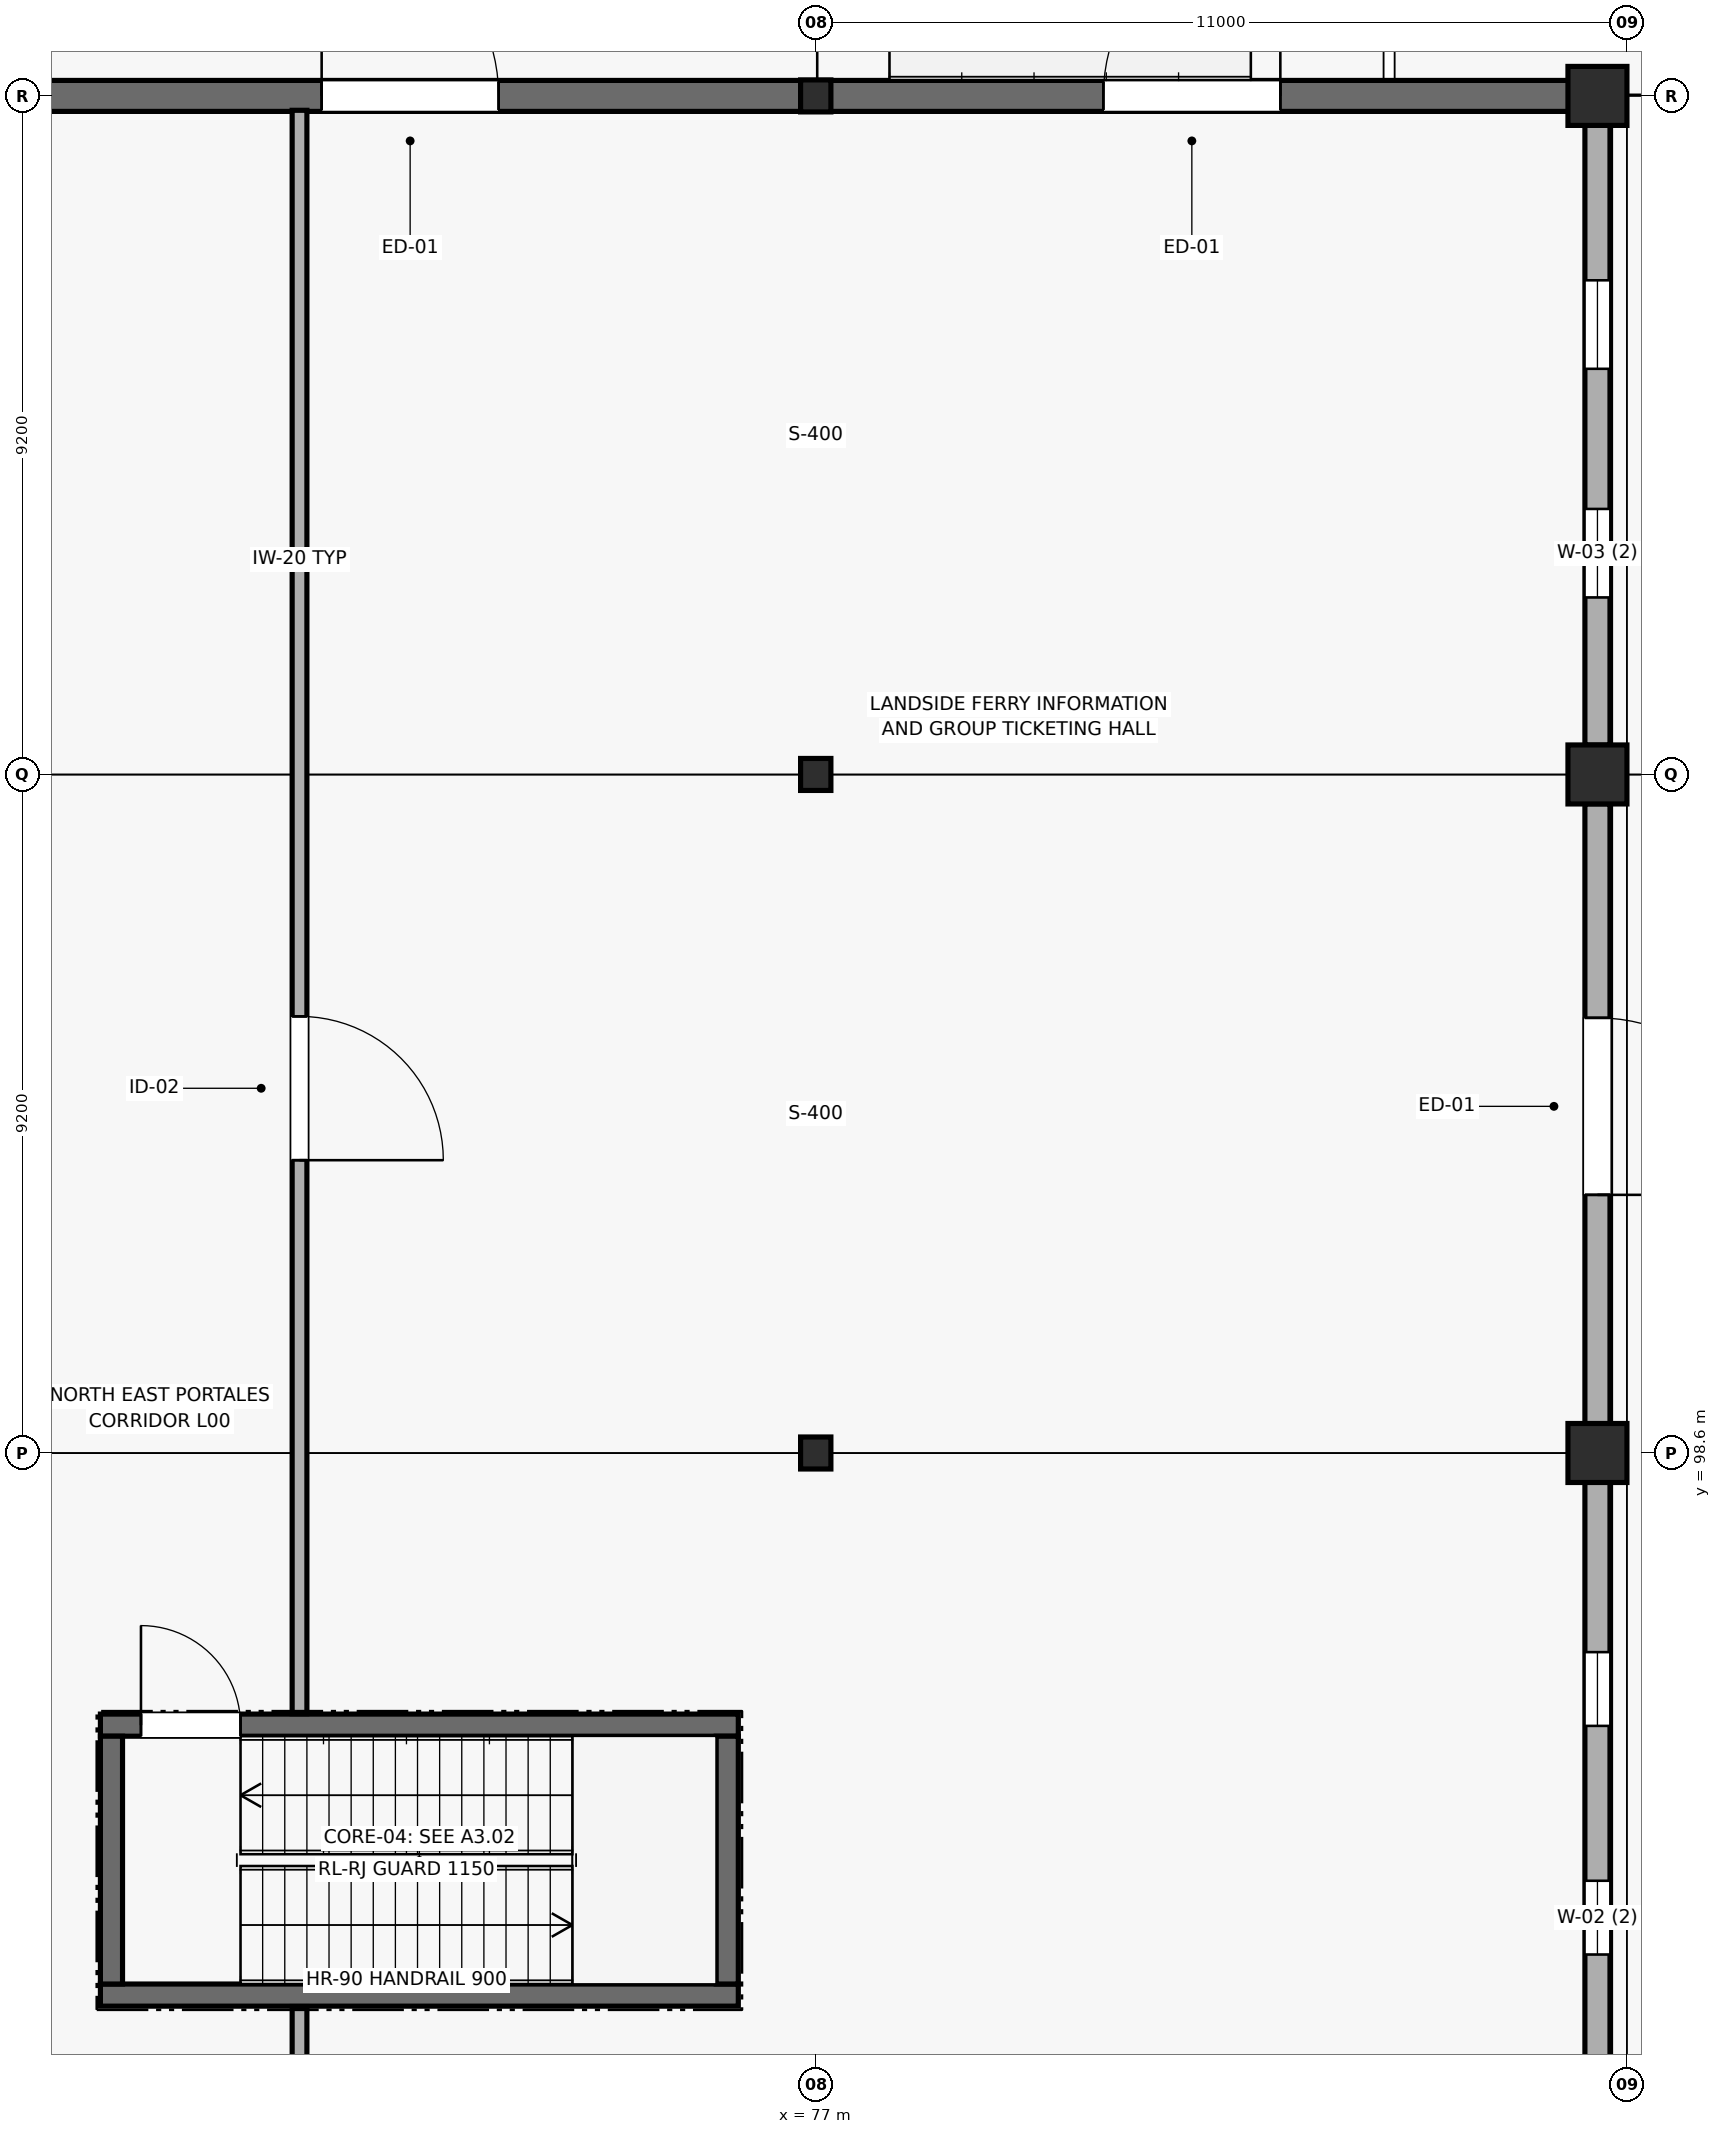
"""IFC4 building model, lengths in metres.
Left out: names, types, materials, properties, quantities, classifications, styles, units other than length and angle.
Written with IfcOpenShell. Run it as: python <this file> out.ifc"""

import sys

from ifc_helpers import new_model, si_unit, direction, frame, frame_2d, origin, origin_2d, place, context, subcontext, project, spatial, rectangle, i_section, extrude, element, fill, save


model = new_model("IFC4")
c1 = context("Model", 3, precision=1e-05, world=origin(), true_north=direction((0.0, 1.0)))
c2 = subcontext(c1, "Body", "Model", "MODEL_VIEW")
j1 = project(units=[si_unit("LENGTHUNIT", "METRE"), si_unit("PLANEANGLEUNIT", "RADIAN")], contexts=[c1])
p1 = place(None, origin())
s1 = spatial("IfcSite", under=j1, at=p1, CompositionType="ELEMENT")
p2 = place(p1, origin())
s2 = spatial("IfcBuilding", under=s1, at=p2, CompositionType="ELEMENT")
p3 = place(p2, origin())
s3 = spatial("IfcBuildingStorey", under=s2, at=p3, CompositionType="ELEMENT", Elevation=0.0)
for number, where, z_axis, x_axis in (
    (1, (77.0, 98.6, 0.0), (0.0, 0.0, 1.0), (1.0, 0.0, 0.0)),
    (2, (77.0, 107.8, 0.0), (0.0, 0.0, 1.0), (1.0, 0.0, 0.0)),
    (3, (77.0, 117.0, 0.0), (0.0, 0.0, 1.0), (1.0, 0.0, 0.0)),
):
    element("IfcColumn", number, at=place(p3, frame(where, z_axis=z_axis, x_axis=x_axis)), inside=s3, PredefinedType="COLUMN", context=c2, shape_type="SweptSolid", body=[
        extrude(i_section(OverallWidth=0.411, OverallDepth=0.434, WebThickness=0.036, FlangeThickness=0.057, at=origin_2d()), origin(), (0.0, 0.0, 1.0), 5.4),
    ])
for number, where, z_axis, x_axis in (
    (4, (87.6, 98.6, 0.0), (0.0, 0.0, 1.0), (1.0, 0.0, 0.0)),
    (5, (87.6, 107.8, 0.0), (0.0, 0.0, 1.0), (1.0, 0.0, 0.0)),
    (6, (87.6, 117.0, 0.0), (0.0, 0.0, 1.0), (1.0, 0.0, 0.0)),
):
    element("IfcColumn", number, at=place(p3, frame(where, z_axis=z_axis, x_axis=x_axis)), inside=s3, PredefinedType="COLUMN", context=c2, shape_type="SweptSolid", body=[
        extrude(rectangle(XDim=0.8, YDim=0.8, at=origin_2d()), origin(), (0.0, 0.0, 1.0), 5.4),
    ])
p4 = place(p3, frame((76.984, 117.0, 0.0), z_axis=(0.0, 0.0, 1.0), x_axis=(-1.0, 0.0, 0.0)))
e7 = element("IfcWall", 7, at=p4, inside=s3, PredefinedType="SOLIDWALL", context=c2, shape_type="SweptSolid", body=[
    extrude(rectangle(XDim=10.586, YDim=0.38, at=frame_2d((5.293, 0.0))), origin(), (0.0, 0.0, 1.0), 4.425),
])
p5 = place(p4, frame((4.284, 0.0, 0.0)))
e8 = element("IfcOpeningElement", 8, at=p5, cuts=e7, PredefinedType="OPENING", context=c2, shape_type="SweptSolid", body=[
    extrude(rectangle(XDim=2.4, YDim=2.6, at=frame_2d((1.2, 1.3))), frame((0.0, 0.2, 0.0), z_axis=(0.0, -1.0, 0.0), x_axis=(1.0, 0.0, 0.0)), (0.0, 0.0, 1.0), 0.4),
])
p6 = place(p3, frame((87.202, 117.0, 0.0), z_axis=(0.0, 0.0, 1.0), x_axis=(-1.0, 0.0, 0.0)))
e9 = element("IfcWall", 9, at=p6, inside=s3, PredefinedType="SOLIDWALL", context=c2, shape_type="SweptSolid", body=[
    extrude(rectangle(XDim=10.186, YDim=0.38, at=frame_2d((5.093, 0.0))), origin(), (0.0, 0.0, 1.0), 4.425),
])
p7 = place(p6, frame((3.902, 0.0, 0.0)))
e10 = element("IfcOpeningElement", 10, at=p7, cuts=e9, PredefinedType="OPENING", context=c2, shape_type="SweptSolid", body=[
    extrude(rectangle(XDim=2.4, YDim=2.6, at=frame_2d((1.2, 1.3))), frame((0.0, 0.2, 0.0), z_axis=(0.0, -1.0, 0.0), x_axis=(1.0, 0.0, 0.0)), (0.0, 0.0, 1.0), 0.4),
])
p8 = place(p3, frame((87.6, 89.798, 0.0), z_axis=(0.0, 0.0, 1.0), x_axis=(0.0, 1.0, 0.0)))
e11 = element("IfcWall", 11, at=p8, inside=s3, PredefinedType="SOLIDWALL", context=c2, shape_type="SweptSolid", body=[
    extrude(rectangle(XDim=8.404, YDim=0.34, at=frame_2d((4.202, 0.0))), origin(), (0.0, 0.0, 1.0), 4.525),
])
p9 = place(p8, frame((2.002, 0.0, 0.95)))
e12 = element("IfcOpeningElement", 12, at=p9, cuts=e11, PredefinedType="OPENING", context=c2, shape_type="SweptSolid", body=[
    extrude(rectangle(XDim=1.0, YDim=1.8, at=frame_2d((0.5, 0.9))), frame((0.0, 0.18, 0.0), z_axis=(0.0, -1.0, 0.0), x_axis=(1.0, 0.0, 0.0)), (0.0, 0.0, 1.0), 0.36),
])
p10 = place(p8, frame((5.102, 0.0, 0.95)))
e13 = element("IfcOpeningElement", 13, at=p10, cuts=e11, PredefinedType="OPENING", context=c2, shape_type="SweptSolid", body=[
    extrude(rectangle(XDim=1.0, YDim=1.8, at=frame_2d((0.5, 0.9))), frame((0.0, 0.18, 0.0), z_axis=(0.0, -1.0, 0.0), x_axis=(1.0, 0.0, 0.0)), (0.0, 0.0, 1.0), 0.36),
])
p11 = place(p3, frame((87.6, 98.998, 0.0), z_axis=(0.0, 0.0, 1.0), x_axis=(0.0, 1.0, 0.0)))
e14 = element("IfcWall", 14, at=p11, inside=s3, PredefinedType="SOLIDWALL", context=c2, shape_type="SweptSolid", body=[
    extrude(rectangle(XDim=8.404, YDim=0.34, at=frame_2d((4.202, 0.0))), origin(), (0.0, 0.0, 1.0), 4.525),
])
p12 = place(p11, frame((3.102, 0.0, 0.0)))
e15 = element("IfcOpeningElement", 15, at=p12, cuts=e14, PredefinedType="OPENING", context=c2, shape_type="SweptSolid", body=[
    extrude(rectangle(XDim=2.4, YDim=2.6, at=frame_2d((1.2, 1.3))), frame((0.0, 0.18, 0.0), z_axis=(0.0, -1.0, 0.0), x_axis=(1.0, 0.0, 0.0)), (0.0, 0.0, 1.0), 0.36),
])
p13 = place(p3, frame((87.6, 108.198, 0.0), z_axis=(0.0, 0.0, 1.0), x_axis=(0.0, 1.0, 0.0)))
e16 = element("IfcWall", 16, at=p13, inside=s3, PredefinedType="SOLIDWALL", context=c2, shape_type="SweptSolid", body=[
    extrude(rectangle(XDim=8.404, YDim=0.34, at=frame_2d((4.202, 0.0))), origin(), (0.0, 0.0, 1.0), 4.525),
])
p14 = place(p13, frame((2.002, 0.0, 0.95)))
e17 = element("IfcOpeningElement", 17, at=p14, cuts=e16, PredefinedType="OPENING", context=c2, shape_type="SweptSolid", body=[
    extrude(rectangle(XDim=1.2, YDim=1.8, at=frame_2d((0.6, 0.9))), frame((0.0, 0.18, 0.0), z_axis=(0.0, -1.0, 0.0), x_axis=(1.0, 0.0, 0.0)), (0.0, 0.0, 1.0), 0.36),
])
p15 = place(p13, frame((5.102, 0.0, 0.95)))
e18 = element("IfcOpeningElement", 18, at=p15, cuts=e16, PredefinedType="OPENING", context=c2, shape_type="SweptSolid", body=[
    extrude(rectangle(XDim=1.2, YDim=1.8, at=frame_2d((0.6, 0.9))), frame((0.0, 0.18, 0.0), z_axis=(0.0, -1.0, 0.0), x_axis=(1.0, 0.0, 0.0)), (0.0, 0.0, 1.0), 0.36),
])
p16 = place(p3, frame((44.5, 117.0, -1.0), z_axis=(0.0, 0.0, 1.0), x_axis=(1.0, 0.0, 0.0)))
e19 = element("IfcWall", 19, at=p16, inside=s3, PredefinedType="USERDEFINED", context=c2, shape_type="SweptSolid", body=[
    extrude(rectangle(XDim=43.0, YDim=0.42, at=frame_2d((21.5, 0.0))), origin(), (0.0, 0.0, 1.0), 0.58),
])
p17 = place(p3, frame((67.3, 91.25, 0.0), z_axis=(0.0, 0.0, 1.0), x_axis=(1.0, 0.0, 0.0)))
e20 = element("IfcWall", 20, at=p17, inside=s3, PredefinedType="SHEAR", context=c2, shape_type="SweptSolid", body=[
    extrude(rectangle(XDim=8.65, YDim=0.3, at=frame_2d((4.325, 0.0))), origin(), (0.0, 0.0, 1.0), 5.18),
])
p18 = place(p3, frame((75.95, 94.91, 0.0), z_axis=(0.0, 0.0, 1.0), x_axis=(-1.0, 0.0, 0.0)))
e21 = element("IfcWall", 21, at=p18, inside=s3, PredefinedType="SHEAR", context=c2, shape_type="SweptSolid", body=[
    extrude(rectangle(XDim=8.65, YDim=0.3, at=frame_2d((4.325, 0.0))), origin(), (0.0, 0.0, 1.0), 5.18),
])
p19 = place(p18, frame((6.75, 0.0, 0.0)))
e22 = element("IfcOpeningElement", 22, at=p19, cuts=e21, PredefinedType="OPENING", context=c2, shape_type="SweptSolid", body=[
    extrude(rectangle(XDim=1.35, YDim=2.2, at=frame_2d((0.675, 1.1))), frame((0.0, 0.16, 0.0), z_axis=(0.0, -1.0, 0.0), x_axis=(1.0, 0.0, 0.0)), (0.0, 0.0, 1.0), 0.32),
])
for number, where, z_axis, x_axis in (
    (23, (67.45, 94.76, 0.0), (0.0, 0.0, 1.0), (0.0, -1.0, 0.0)),
    (24, (75.8, 91.4, 0.0), (0.0, 0.0, 1.0), (0.0, 1.0, 0.0)),
):
    element("IfcWall", number, at=place(p3, frame(where, z_axis=z_axis, x_axis=x_axis)), inside=s3, PredefinedType="SHEAR", context=c2, shape_type="SweptSolid", body=[
        extrude(rectangle(XDim=3.36, YDim=0.3, at=frame_2d((1.68, 0.0))), origin(), (0.0, 0.0, 1.0), 5.18),
    ])
p20 = place(p3, frame((70.0, 95.065, 0.0), z_axis=(0.0, 0.0, 1.0), x_axis=(0.0, 1.0, 0.0)))
e25 = element("IfcWall", 25, at=p20, inside=s3, PredefinedType="PARTITIONING", context=c2, shape_type="SweptSolid", body=[
    extrude(rectangle(XDim=21.74, YDim=0.2, at=frame_2d((10.87, 0.0))), origin(), (0.0, 0.0, 1.0), 4.425),
])
p21 = place(p20, frame((7.505, 0.0, 0.0)))
e26 = element("IfcOpeningElement", 26, at=p21, cuts=e25, PredefinedType="OPENING", context=c2, shape_type="SweptSolid", body=[
    extrude(rectangle(XDim=1.95, YDim=2.45, at=frame_2d((0.975, 1.225))), frame((0.0, 0.11, 0.0), z_axis=(0.0, -1.0, 0.0), x_axis=(1.0, 0.0, 0.0)), (0.0, 0.0, 1.0), 0.22),
])
p22 = place(p3, frame((70.0, 71.775, 0.0), z_axis=(0.0, 0.0, 1.0), x_axis=(0.0, 1.0, 0.0)))
e27 = element("IfcWall", 27, at=p22, inside=s3, PredefinedType="PARTITIONING", context=c2, shape_type="SweptSolid", body=[
    extrude(rectangle(XDim=19.32, YDim=0.2, at=frame_2d((9.66, 0.0))), origin(), (0.0, 0.0, 1.0), 4.425),
])
p23 = place(p22, frame((7.525, 0.0, 0.0)))
e28 = element("IfcOpeningElement", 28, at=p23, cuts=e27, PredefinedType="OPENING", context=c2, shape_type="SweptSolid", body=[
    extrude(rectangle(XDim=1.85, YDim=2.4, at=frame_2d((0.925, 1.2))), frame((0.0, 0.11, 0.0), z_axis=(0.0, -1.0, 0.0), x_axis=(1.0, 0.0, 0.0)), (0.0, 0.0, 1.0), 0.22),
])
p24 = place(p5, frame((2.4, 0.0, 0.0), z_axis=(0.0, 0.0, 1.0), x_axis=(-1.0, 0.0, 0.0)))
e29 = element("IfcDoor", 29, at=p24, inside=s3, OperationType="SINGLE_SWING_LEFT", PredefinedType="DOOR", context=c2, shape_type="SweptSolid", body=[
    extrude(rectangle(XDim=2.4, YDim=2.6, at=frame_2d((1.2, 1.3))), frame((0.0, 0.025, 0.0), z_axis=(0.0, -1.0, 0.0), x_axis=(1.0, 0.0, 0.0)), (0.0, 0.0, 1.0), 0.05),
])
fill(e8, e29)
p25 = place(p7, frame((2.4, 0.0, 0.0), z_axis=(0.0, 0.0, 1.0), x_axis=(-1.0, 0.0, 0.0)))
e30 = element("IfcDoor", 30, at=p25, inside=s3, OperationType="SINGLE_SWING_RIGHT", PredefinedType="DOOR", context=c2, shape_type="SweptSolid", body=[
    extrude(rectangle(XDim=2.4, YDim=2.6, at=frame_2d((1.2, 1.3))), frame((0.0, 0.025, 0.0), z_axis=(0.0, -1.0, 0.0), x_axis=(1.0, 0.0, 0.0)), (0.0, 0.0, 1.0), 0.05),
])
fill(e10, e30)
p26 = place(p9, origin())
e31 = element("IfcWindow", 31, at=p26, inside=s3, PartitioningType="SINGLE_PANEL", PredefinedType="WINDOW", context=c2, shape_type="SweptSolid", body=[
    extrude(rectangle(XDim=1.0, YDim=1.8, at=frame_2d((0.5, 0.9))), frame((0.0, 0.03, 0.0), z_axis=(0.0, -1.0, 0.0), x_axis=(1.0, 0.0, 0.0)), (0.0, 0.0, 1.0), 0.06),
])
fill(e12, e31)
p27 = place(p10, origin())
e32 = element("IfcWindow", 32, at=p27, inside=s3, PartitioningType="SINGLE_PANEL", PredefinedType="WINDOW", context=c2, shape_type="SweptSolid", body=[
    extrude(rectangle(XDim=1.0, YDim=1.8, at=frame_2d((0.5, 0.9))), frame((0.0, 0.03, 0.0), z_axis=(0.0, -1.0, 0.0), x_axis=(1.0, 0.0, 0.0)), (0.0, 0.0, 1.0), 0.06),
])
fill(e13, e32)
p28 = place(p12, frame((2.4, 0.0, 0.0), z_axis=(0.0, 0.0, 1.0), x_axis=(-1.0, 0.0, 0.0)))
e33 = element("IfcDoor", 33, at=p28, inside=s3, OperationType="SINGLE_SWING_RIGHT", PredefinedType="DOOR", context=c2, shape_type="SweptSolid", body=[
    extrude(rectangle(XDim=2.4, YDim=2.6, at=frame_2d((1.2, 1.3))), frame((0.0, 0.025, 0.0), z_axis=(0.0, -1.0, 0.0), x_axis=(1.0, 0.0, 0.0)), (0.0, 0.0, 1.0), 0.05),
])
fill(e15, e33)
p29 = place(p14, origin())
e34 = element("IfcWindow", 34, at=p29, inside=s3, PartitioningType="SINGLE_PANEL", PredefinedType="WINDOW", context=c2, shape_type="SweptSolid", body=[
    extrude(rectangle(XDim=1.2, YDim=1.8, at=frame_2d((0.6, 0.9))), frame((0.0, 0.03, 0.0), z_axis=(0.0, -1.0, 0.0), x_axis=(1.0, 0.0, 0.0)), (0.0, 0.0, 1.0), 0.06),
])
fill(e17, e34)
p30 = place(p15, origin())
e35 = element("IfcWindow", 35, at=p30, inside=s3, PartitioningType="SINGLE_PANEL", PredefinedType="WINDOW", context=c2, shape_type="SweptSolid", body=[
    extrude(rectangle(XDim=1.2, YDim=1.8, at=frame_2d((0.6, 0.9))), frame((0.0, 0.03, 0.0), z_axis=(0.0, -1.0, 0.0), x_axis=(1.0, 0.0, 0.0)), (0.0, 0.0, 1.0), 0.06),
])
fill(e18, e35)
p31 = place(p19, frame((1.35, 0.0, 0.0), z_axis=(0.0, 0.0, 1.0), x_axis=(-1.0, 0.0, 0.0)))
e36 = element("IfcDoor", 36, at=p31, inside=s3, OperationType="SINGLE_SWING_LEFT", PredefinedType="DOOR", context=c2, shape_type="SweptSolid", body=[
    extrude(rectangle(XDim=1.35, YDim=2.2, at=frame_2d((0.675, 1.1))), frame((0.0, 0.025, 0.0), z_axis=(0.0, -1.0, 0.0), x_axis=(1.0, 0.0, 0.0)), (0.0, 0.0, 1.0), 0.05),
])
fill(e22, e36)
p32 = place(p21, frame((1.95, 0.0, 0.0), z_axis=(0.0, 0.0, 1.0), x_axis=(-1.0, 0.0, 0.0)))
e37 = element("IfcDoor", 37, at=p32, inside=s3, OperationType="SINGLE_SWING_RIGHT", PredefinedType="DOOR", context=c2, shape_type="SweptSolid", body=[
    extrude(rectangle(XDim=1.95, YDim=2.45, at=frame_2d((0.975, 1.225))), frame((0.0, 0.025, 0.0), z_axis=(0.0, -1.0, 0.0), x_axis=(1.0, 0.0, 0.0)), (0.0, 0.0, 1.0), 0.05),
])
fill(e26, e37)
save(model, sys.argv[1])
